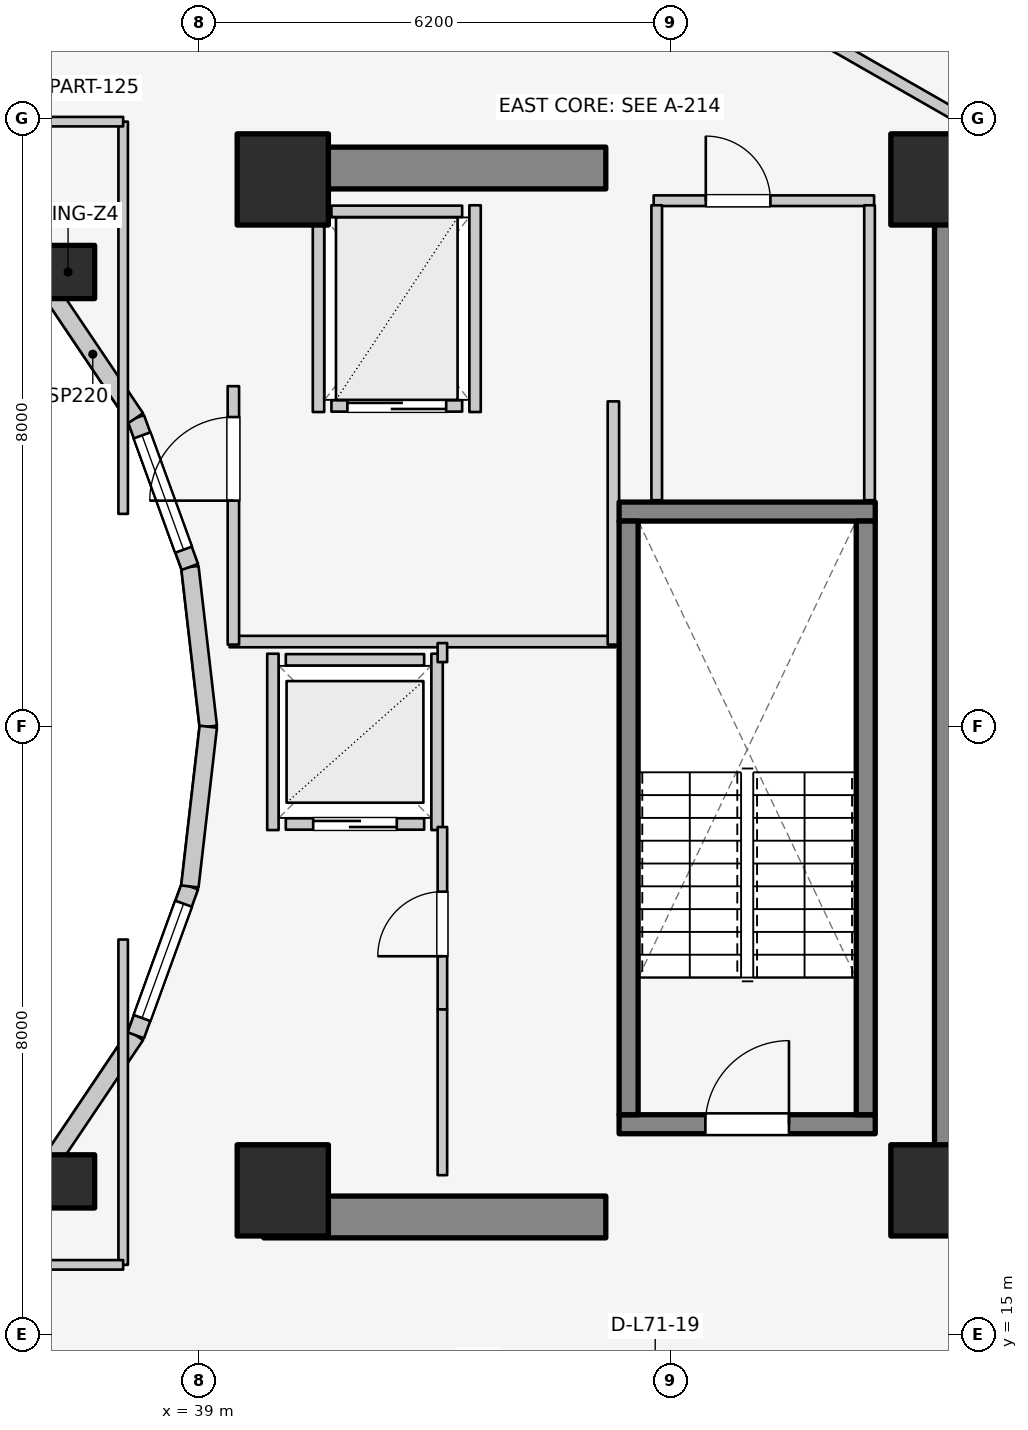
"""IFC4 building model, lengths in metres.
Left out: names, types, materials, properties, quantities, classifications, styles, units other than length and angle.
Written with IfcOpenShell. Run it as: python <this file> out.ifc"""

import sys

from ifc_helpers import new_model, si_unit, direction, frame, frame_2d, origin, origin_2d, place, context, subcontext, project, spatial, rectangle, extrude, element, fill, save


model = new_model("IFC4")
c1 = context("Model", 3, precision=1e-05, world=origin(), true_north=direction((0.0, 1.0)))
c2 = subcontext(c1, "Body", "Model", "MODEL_VIEW")
j1 = project(units=[si_unit("LENGTHUNIT", "METRE"), si_unit("PLANEANGLEUNIT", "RADIAN")], contexts=[c1])
p1 = place(None, origin())
s1 = spatial("IfcSite", under=j1, at=p1, CompositionType="ELEMENT")
p2 = place(p1, origin())
s2 = spatial("IfcBuilding", under=s1, at=p2, CompositionType="ELEMENT")
p3 = place(p2, frame((0.0, 0.0, 232.6)))
s3 = spatial("IfcBuildingStorey", under=s2, at=p3, CompositionType="ELEMENT", Elevation=232.6)
p4 = place(p3, frame((48.95, 17.05, 0.0), z_axis=(0.0, 0.0, 1.0), x_axis=(0.0, 1.0, 0.0)))
e1 = element("IfcWall", 1, at=p4, inside=s3, PredefinedType="SHEAR", context=c2, shape_type="SweptSolid", body=[
    extrude(rectangle(XDim=12.8, YDim=0.55, at=frame_2d((6.4, 0.0))), origin(), (0.0, 0.0, 1.0), 3.1),
])
for number, where, z_axis, x_axis in (
    (2, (39.85, 16.55, 0.0), (0.0, 0.0, 1.0), (1.0, 0.0, 0.0)),
    (3, (39.85, 30.35, 0.0), (0.0, 0.0, 1.0), (1.0, 0.0, 0.0)),
):
    element("IfcWall", number, at=place(p3, frame(where, z_axis=z_axis, x_axis=x_axis)), inside=s3, PredefinedType="SHEAR", context=c2, shape_type="SweptSolid", body=[
        extrude(rectangle(XDim=4.5, YDim=0.55, at=frame_2d((2.25, 0.0))), origin(), (0.0, 0.0, 1.0), 3.1),
    ])
p5 = place(p3, frame((44.525, 17.77, 0.0), z_axis=(0.0, 0.0, 1.0), x_axis=(1.0, 0.0, 0.0)))
e4 = element("IfcWall", 4, at=p5, inside=s3, PredefinedType="SOLIDWALL", context=c2, shape_type="SweptSolid", body=[
    extrude(rectangle(XDim=3.37, YDim=0.25, at=frame_2d((1.685, 0.0))), origin(), (0.0, 0.0, 1.0), 3.1),
])
p6 = place(p5, frame((1.135, 0.0, 0.0)))
e5 = element("IfcOpeningElement", 5, at=p6, cuts=e4, PredefinedType="OPENING", context=c2, shape_type="SweptSolid", body=[
    extrude(rectangle(XDim=1.1, YDim=2.1, at=frame_2d((0.55, 1.05))), frame((0.0, 0.135, 0.0), z_axis=(0.0, -1.0, 0.0), x_axis=(1.0, 0.0, 0.0)), (0.0, 0.0, 1.0), 0.27),
])
p7 = place(p3, frame((44.525, 25.83, 0.0), z_axis=(0.0, 0.0, 1.0), x_axis=(1.0, 0.0, 0.0)))
e6 = element("IfcWall", 6, at=p7, inside=s3, PredefinedType="SOLIDWALL", context=c2, shape_type="SweptSolid", body=[
    extrude(rectangle(XDim=3.37, YDim=0.25, at=frame_2d((1.685, 0.0))), origin(), (0.0, 0.0, 1.0), 3.1),
])
for number, where, z_axis, x_axis in (
    (7, (44.65, 17.895, 0.0), (0.0, 0.0, 1.0), (0.0, 1.0, 0.0)),
    (8, (47.77, 17.895, 0.0), (0.0, 0.0, 1.0), (0.0, 1.0, 0.0)),
):
    element("IfcWall", number, at=place(p3, frame(where, z_axis=z_axis, x_axis=x_axis)), inside=s3, PredefinedType="SOLIDWALL", context=c2, shape_type="SweptSolid", body=[
        extrude(rectangle(XDim=7.81, YDim=0.25, at=frame_2d((3.905, 0.0))), origin(), (0.0, 0.0, 1.0), 3.1),
    ])
for number, where, z_axis, x_axis in (
    (9, (40.1, 16.9, 0.0), (0.0, 0.0, 1.0), (1.0, 0.0, 0.0)),
    (10, (48.7, 16.9, 0.0), (0.0, 0.0, 1.0), (1.0, 0.0, 0.0)),
    (11, (48.7, 30.2, 0.0), (0.0, 0.0, 1.0), (1.0, 0.0, 0.0)),
    (12, (40.1, 30.2, 0.0), (0.0, 0.0, 1.0), (1.0, 0.0, 0.0)),
):
    element("IfcColumn", number, at=place(p3, frame(where, z_axis=z_axis, x_axis=x_axis)), inside=s3, PredefinedType="COLUMN", context=c2, shape_type="SweptSolid", body=[
        extrude(rectangle(XDim=1.2, YDim=1.2, at=origin_2d()), origin(), (0.0, 0.0, 1.0), 3.1),
    ])
for number, where, z_axis, x_axis in (
    (13, (37.275, 28.982, 0.0), (0.0, 0.0, 1.0), (1.0, 0.0, 0.0)),
    (14, (37.275, 17.018, 0.0), (0.0, 0.0, 1.0), (1.0, 0.0, 0.0)),
):
    element("IfcColumn", number, at=place(p3, frame(where, z_axis=z_axis, x_axis=x_axis)), inside=s3, PredefinedType="COLUMN", context=c2, shape_type="SweptSolid", body=[
        extrude(rectangle(XDim=0.7, YDim=0.7, at=origin_2d()), origin(), (0.0, 0.0, 1.0), 3.1),
    ])
p8 = place(p3, frame((39.12, 23.0, 0.0), z_axis=(0.0, 0.0, 1.0), x_axis=(-0.114711713601, 0.993398823617, 0.0)))
e15 = element("IfcWall", 15, at=p8, inside=s3, PredefinedType="STANDARD", context=c2, shape_type="SweptSolid", body=[
    extrude(rectangle(XDim=2.115, YDim=0.23, at=frame_2d((1.058, 0.0))), origin(), (0.0, 0.0, 1.0), 2.84),
])
p9 = place(p3, frame((38.877, 25.102, 0.0), z_axis=(0.0, 0.0, 1.0), x_axis=(-0.341423187295, 0.93990968033, 0.0)))
e16 = element("IfcWall", 16, at=p9, inside=s3, PredefinedType="STANDARD", context=c2, shape_type="SweptSolid", body=[
    extrude(rectangle(XDim=2.084, YDim=0.23, at=frame_2d((1.042, 0.0))), origin(), (0.0, 0.0, 1.0), 2.84),
])
p10 = place(p9, frame((0.242, 0.0, 0.85)))
e17 = element("IfcOpeningElement", 17, at=p10, cuts=e16, PredefinedType="OPENING", context=c2, shape_type="SweptSolid", body=[
    extrude(rectangle(XDim=1.6, YDim=1.65, at=frame_2d((0.8, 0.825))), frame((0.0, 0.125, 0.0), z_axis=(0.0, -1.0, 0.0), x_axis=(1.0, 0.0, 0.0)), (0.0, 0.0, 1.0), 0.25),
])
p11 = place(p3, frame((38.166, 27.06, 0.0), z_axis=(0.0, 0.0, 1.0), x_axis=(-0.558197800898, 0.829707909492, 0.0)))
e18 = element("IfcWall", 18, at=p11, inside=s3, PredefinedType="STANDARD", context=c2, shape_type="SweptSolid", body=[
    extrude(rectangle(XDim=2.027, YDim=0.23, at=frame_2d((1.013, 0.0))), origin(), (0.0, 0.0, 1.0), 2.16),
])
for number, where, z_axis, x_axis in (
    (19, (37.035, 28.742, 0.0), (0.0, 0.0, 1.0), (-0.753, 0.659, 0.0)),
    (20, (35.56, 15.968, 0.0), (0.0, 0.0, 1.0), (0.753, 0.659, 0.0)),
):
    element("IfcWall", number, at=place(p3, frame(where, z_axis=z_axis, x_axis=x_axis)), inside=s3, PredefinedType="STANDARD", context=c2, shape_type="SweptSolid", body=[
        extrude(rectangle(XDim=1.959, YDim=0.23, at=frame_2d((0.98, 0.0))), origin(), (0.0, 0.0, 1.0), 2.16),
    ])
p12 = place(p3, frame((37.035, 17.258, 0.0), z_axis=(0.0, 0.0, 1.0), x_axis=(0.558197800898, 0.829707909492, 0.0)))
e21 = element("IfcWall", 21, at=p12, inside=s3, PredefinedType="STANDARD", context=c2, shape_type="SweptSolid", body=[
    extrude(rectangle(XDim=2.027, YDim=0.23, at=frame_2d((1.013, 0.0))), origin(), (0.0, 0.0, 1.0), 2.16),
])
p13 = place(p3, frame((38.166, 18.94, 0.0), z_axis=(0.0, 0.0, 1.0), x_axis=(0.341423187295, 0.93990968033, 0.0)))
e22 = element("IfcWall", 22, at=p13, inside=s3, PredefinedType="STANDARD", context=c2, shape_type="SweptSolid", body=[
    extrude(rectangle(XDim=2.084, YDim=0.23, at=frame_2d((1.042, 0.0))), origin(), (0.0, 0.0, 1.0), 2.84),
])
p14 = place(p13, frame((0.242, 0.0, 0.85)))
e23 = element("IfcOpeningElement", 23, at=p14, cuts=e22, PredefinedType="OPENING", context=c2, shape_type="SweptSolid", body=[
    extrude(rectangle(XDim=1.6, YDim=1.65, at=frame_2d((0.8, 0.825))), frame((0.0, 0.125, 0.0), z_axis=(0.0, -1.0, 0.0), x_axis=(1.0, 0.0, 0.0)), (0.0, 0.0, 1.0), 0.25),
])
p15 = place(p3, frame((38.877, 20.898, 0.0), z_axis=(0.0, 0.0, 1.0), x_axis=(0.114711713601, 0.993398823617, 0.0)))
e24 = element("IfcWall", 24, at=p15, inside=s3, PredefinedType="STANDARD", context=c2, shape_type="SweptSolid", body=[
    extrude(rectangle(XDim=2.115, YDim=0.23, at=frame_2d((1.058, 0.0))), origin(), (0.0, 0.0, 1.0), 2.84),
])
p16 = place(p3, frame((50.761, 31.849, 0.0), z_axis=(0.0, 0.0, 1.0), x_axis=(-0.72731899451, 0.686299555752, 0.0)))
e25 = element("IfcWall", 25, at=p16, inside=s3, PredefinedType="STANDARD", context=c2, shape_type="SweptSolid", body=[
    extrude(rectangle(XDim=4.404, YDim=0.26, at=frame_2d((2.202, 0.0))), origin(), (0.0, 0.0, 1.0), 2.85),
])
p17 = place(p16, frame((1.452, 0.0, 0.75)))
e26 = element("IfcOpeningElement", 26, at=p17, cuts=e25, PredefinedType="OPENING", context=c2, shape_type="SweptSolid", body=[
    extrude(rectangle(XDim=1.5, YDim=1.6, at=frame_2d((0.75, 0.8))), frame((0.0, 0.14, 0.0), z_axis=(0.0, -1.0, 0.0), x_axis=(1.0, 0.0, 0.0)), (0.0, 0.0, 1.0), 0.28),
])
p18 = place(p3, frame((40.14, 21.72, 0.0), z_axis=(0.0, 0.0, 1.0), x_axis=(1.0, 0.0, 0.0)))
e27 = element("IfcWall", 27, at=p18, inside=s3, PredefinedType="SOLIDWALL", context=c2, shape_type="SweptSolid", body=[
    extrude(rectangle(XDim=1.82, YDim=0.15, at=frame_2d((0.91, 0.0))), origin(), (0.0, 0.0, 1.0), 2.12),
])
p19 = place(p18, frame((0.36, 0.0, 0.0)))
e28 = element("IfcOpeningElement", 28, at=p19, cuts=e27, PredefinedType="OPENING", context=c2, shape_type="SweptSolid", body=[
    extrude(rectangle(XDim=1.1, YDim=2.1, at=frame_2d((0.55, 1.05))), frame((0.0, 0.085, 0.0), z_axis=(0.0, -1.0, 0.0), x_axis=(1.0, 0.0, 0.0)), (0.0, 0.0, 1.0), 0.17),
])
p20 = place(p3, frame((40.14, 23.88, 0.0), z_axis=(0.0, 0.0, 1.0), x_axis=(1.0, 0.0, 0.0)))
e29 = element("IfcWall", 29, at=p20, inside=s3, PredefinedType="SOLIDWALL", context=c2, shape_type="SweptSolid", body=[
    extrude(rectangle(XDim=1.82, YDim=0.15, at=frame_2d((0.91, 0.0))), origin(), (0.0, 0.0, 1.0), 2.12),
])
p21 = place(p3, frame((39.97, 21.64, 0.0), z_axis=(0.0, 0.0, 1.0), x_axis=(0.0, 1.0, 0.0)))
e30 = element("IfcWall", 30, at=p21, inside=s3, PredefinedType="SOLIDWALL", context=c2, shape_type="SweptSolid", body=[
    extrude(rectangle(XDim=2.32, YDim=0.15, at=frame_2d((1.16, 0.0))), origin(), (0.0, 0.0, 1.0), 2.12),
])
p22 = place(p3, frame((42.13, 21.64, 0.0), z_axis=(0.0, 0.0, 1.0), x_axis=(0.0, 1.0, 0.0)))
e31 = element("IfcWall", 31, at=p22, inside=s3, PredefinedType="SOLIDWALL", context=c2, shape_type="SweptSolid", body=[
    extrude(rectangle(XDim=2.32, YDim=0.15, at=frame_2d((1.16, 0.0))), origin(), (0.0, 0.0, 1.0), 2.855),
])
p23 = place(p3, frame((40.74, 27.22, 0.0), z_axis=(0.0, 0.0, 1.0), x_axis=(1.0, 0.0, 0.0)))
e32 = element("IfcWall", 32, at=p23, inside=s3, PredefinedType="SOLIDWALL", context=c2, shape_type="SweptSolid", body=[
    extrude(rectangle(XDim=1.72, YDim=0.15, at=frame_2d((0.86, 0.0))), origin(), (0.0, 0.0, 1.0), 2.855),
])
p24 = place(p23, frame((0.21, 0.0, 0.0)))
e33 = element("IfcOpeningElement", 33, at=p24, cuts=e32, PredefinedType="OPENING", context=c2, shape_type="SweptSolid", body=[
    extrude(rectangle(XDim=1.3, YDim=2.1, at=frame_2d((0.65, 1.05))), frame((0.0, 0.085, 0.0), z_axis=(0.0, -1.0, 0.0), x_axis=(1.0, 0.0, 0.0)), (0.0, 0.0, 1.0), 0.17),
])
p25 = place(p3, frame((40.74, 29.78, 0.0), z_axis=(0.0, 0.0, 1.0), x_axis=(1.0, 0.0, 0.0)))
e34 = element("IfcWall", 34, at=p25, inside=s3, PredefinedType="SOLIDWALL", context=c2, shape_type="SweptSolid", body=[
    extrude(rectangle(XDim=1.72, YDim=0.15, at=frame_2d((0.86, 0.0))), origin(), (0.0, 0.0, 1.0), 2.855),
])
for number, where, z_axis, x_axis in (
    (35, (40.57, 27.14, 0.0), (0.0, 0.0, 1.0), (0.0, 1.0, 0.0)),
    (36, (42.63, 27.14, 0.0), (0.0, 0.0, 1.0), (0.0, 1.0, 0.0)),
):
    element("IfcWall", number, at=place(p3, frame(where, z_axis=z_axis, x_axis=x_axis)), inside=s3, PredefinedType="SOLIDWALL", context=c2, shape_type="SweptSolid", body=[
        extrude(rectangle(XDim=2.72, YDim=0.15, at=frame_2d((1.36, 0.0))), origin(), (0.0, 0.0, 1.0), 2.855),
    ])
p26 = place(p3, frame((39.4, 24.12, 0.0), z_axis=(0.0, 0.0, 1.0), x_axis=(1.0, 0.0, 0.0)))
e37 = element("IfcWall", 37, at=p26, inside=s3, PredefinedType="PARTITIONING", context=c2, shape_type="SweptSolid", body=[
    extrude(rectangle(XDim=5.08, YDim=0.15, at=frame_2d((2.54, 0.0))), origin(), (0.0, 0.0, 1.0), 2.12),
])
p27 = place(p3, frame((44.45, 24.08, 0.0), z_axis=(0.0, 0.0, 1.0), x_axis=(0.0, 1.0, 0.0)))
e38 = element("IfcWall", 38, at=p27, inside=s3, PredefinedType="PARTITIONING", context=c2, shape_type="SweptSolid", body=[
    extrude(rectangle(XDim=3.2, YDim=0.15, at=frame_2d((1.6, 0.0))), origin(), (0.0, 0.0, 1.0), 2.855),
])
p28 = place(p3, frame((39.45, 24.08, 0.0), z_axis=(0.0, 0.0, 1.0), x_axis=(0.0, 1.0, 0.0)))
e39 = element("IfcWall", 39, at=p28, inside=s3, PredefinedType="PARTITIONING", context=c2, shape_type="SweptSolid", body=[
    extrude(rectangle(XDim=3.4, YDim=0.15, at=frame_2d((1.7, 0.0))), origin(), (0.0, 0.0, 1.0), 2.855),
])
p29 = place(p28, frame((1.894, 0.0, 0.0)))
e40 = element("IfcOpeningElement", 40, at=p29, cuts=e39, PredefinedType="OPENING", context=c2, shape_type="SweptSolid", body=[
    extrude(rectangle(XDim=1.1, YDim=2.1, at=frame_2d((0.55, 1.05))), frame((0.0, 0.085, 0.0), z_axis=(0.0, -1.0, 0.0), x_axis=(1.0, 0.0, 0.0)), (0.0, 0.0, 1.0), 0.17),
])
p30 = place(p3, frame((42.2, 19.28, 0.0), z_axis=(0.0, 0.0, 1.0), x_axis=(0.0, 1.0, 0.0)))
e41 = element("IfcWall", 41, at=p30, inside=s3, PredefinedType="PARTITIONING", context=c2, shape_type="SweptSolid", body=[
    extrude(rectangle(XDim=2.4, YDim=0.125, at=frame_2d((1.2, 0.0))), origin(), (0.0, 0.0, 1.0), 2.855),
])
p31 = place(p30, frame((0.7, 0.0, 0.0)))
e42 = element("IfcOpeningElement", 42, at=p31, cuts=e41, PredefinedType="OPENING", context=c2, shape_type="SweptSolid", body=[
    extrude(rectangle(XDim=0.85, YDim=2.05, at=frame_2d((0.425, 1.025))), frame((0.0, 0.073, 0.0), z_axis=(0.0, -1.0, 0.0), x_axis=(1.0, 0.0, 0.0)), (0.0, 0.0, 1.0), 0.145),
])
p32 = place(p3, frame((42.2, 23.85, 0.0), z_axis=(0.0, 0.0, 1.0), x_axis=(0.0, 1.0, 0.0)))
e43 = element("IfcWall", 43, at=p32, inside=s3, PredefinedType="PARTITIONING", context=c2, shape_type="SweptSolid", body=[
    extrude(rectangle(XDim=0.25, YDim=0.125, at=frame_2d((0.125, 0.0))), origin(), (0.0, 0.0, 1.0), 2.855),
])
p33 = place(p3, frame((42.2, 17.1, 0.0), z_axis=(0.0, 0.0, 1.0), x_axis=(0.0, 1.0, 0.0)))
e44 = element("IfcWall", 44, at=p33, inside=s3, PredefinedType="PARTITIONING", context=c2, shape_type="SweptSolid", body=[
    extrude(rectangle(XDim=2.18, YDim=0.125, at=frame_2d((1.09, 0.0))), origin(), (0.0, 0.0, 1.0), 2.855),
])
p34 = place(p3, frame((44.98, 29.92, 0.0), z_axis=(0.0, 0.0, 1.0), x_axis=(1.0, 0.0, 0.0)))
e45 = element("IfcWall", 45, at=p34, inside=s3, PredefinedType="PLUMBINGWALL", context=c2, shape_type="SweptSolid", body=[
    extrude(rectangle(XDim=2.9, YDim=0.14, at=frame_2d((1.45, 0.0))), origin(), (0.0, 0.0, 1.0), 2.855),
])
p35 = place(p34, frame((0.686, 0.0, 0.0)))
e46 = element("IfcOpeningElement", 46, at=p35, cuts=e45, PredefinedType="OPENING", context=c2, shape_type="SweptSolid", body=[
    extrude(rectangle(XDim=0.85, YDim=2.05, at=frame_2d((0.425, 1.025))), frame((0.0, 0.08, 0.0), z_axis=(0.0, -1.0, 0.0), x_axis=(1.0, 0.0, 0.0)), (0.0, 0.0, 1.0), 0.16),
])
for number, where, z_axis, x_axis in (
    (47, (45.02, 25.98, 0.0), (0.0, 0.0, 1.0), (0.0, 1.0, 0.0)),
    (48, (47.82, 25.98, 0.0), (0.0, 0.0, 1.0), (0.0, 1.0, 0.0)),
):
    element("IfcWall", number, at=place(p3, frame(where, z_axis=z_axis, x_axis=x_axis)), inside=s3, PredefinedType="PLUMBINGWALL", context=c2, shape_type="SweptSolid", body=[
        extrude(rectangle(XDim=3.88, YDim=0.14, at=frame_2d((1.94, 0.0))), origin(), (0.0, 0.0, 1.0), 2.855),
    ])
p36 = place(p3, frame((35.55, 30.015, 0.0), z_axis=(0.0, 0.0, 1.0), x_axis=(0.522763432117, 0.852477796802, 0.0)))
e49 = element("IfcWall", 49, at=p36, inside=s3, PredefinedType="PARTITIONING", context=c2, shape_type="SweptSolid", body=[
    extrude(rectangle(XDim=3.269, YDim=0.125, at=frame_2d((1.635, 0.0))), origin(), (0.0, 0.0, 1.0), 2.376),
])
p37 = place(p3, frame((35.55, 15.985, 0.0), z_axis=(0.0, 0.0, 1.0), x_axis=(0.52592395012, -0.850531597702, 0.0)))
e50 = element("IfcWall", 50, at=p37, inside=s3, PredefinedType="PARTITIONING", context=c2, shape_type="SweptSolid", body=[
    extrude(rectangle(XDim=2.869, YDim=0.125, at=frame_2d((1.435, 0.0))), origin(), (0.0, 0.0, 1.0), 2.376),
])
p38 = place(p3, frame((38.0, 25.8, 0.0), z_axis=(0.0, 0.0, 1.0), x_axis=(0.0, 1.0, 0.0)))
e51 = element("IfcWall", 51, at=p38, inside=s3, PredefinedType="PARTITIONING", context=c2, shape_type="SweptSolid", body=[
    extrude(rectangle(XDim=5.16, YDim=0.125, at=frame_2d((2.58, 0.0))), origin(), (0.0, 0.0, 1.0), 2.232),
])
p39 = place(p3, frame((35.4, 30.96, 0.0), z_axis=(0.0, 0.0, 1.0), x_axis=(1.0, 0.0, 0.0)))
e52 = element("IfcWall", 52, at=p39, inside=s3, PredefinedType="PARTITIONING", context=c2, shape_type="SweptSolid", body=[
    extrude(rectangle(XDim=2.6, YDim=0.125, at=frame_2d((1.3, 0.0))), origin(), (0.0, 0.0, 1.0), 2.376),
])
p40 = place(p3, frame((38.0, 15.92, 0.0), z_axis=(0.0, 0.0, 1.0), x_axis=(0.0, 1.0, 0.0)))
e53 = element("IfcWall", 53, at=p40, inside=s3, PredefinedType="PARTITIONING", context=c2, shape_type="SweptSolid", body=[
    extrude(rectangle(XDim=4.28, YDim=0.125, at=frame_2d((2.14, 0.0))), origin(), (0.0, 0.0, 1.0), 2.232),
])
p41 = place(p3, frame((35.4, 15.92, 0.0), z_axis=(0.0, 0.0, 1.0), x_axis=(1.0, 0.0, 0.0)))
e54 = element("IfcWall", 54, at=p41, inside=s3, PredefinedType="PARTITIONING", context=c2, shape_type="SweptSolid", body=[
    extrude(rectangle(XDim=2.6, YDim=0.125, at=frame_2d((1.3, 0.0))), origin(), (0.0, 0.0, 1.0), 2.232),
])
p42 = place(p3, frame((46.757, 32.305, 0.0), z_axis=(0.0, 0.0, 1.0), x_axis=(0.867991349648, -0.496579315857, 0.0)))
e55 = element("IfcWall", 55, at=p42, inside=s3, PredefinedType="PARTITIONING", context=c2, shape_type="SweptSolid", body=[
    extrude(rectangle(XDim=2.567, YDim=0.15, at=frame_2d((1.283, 0.0))), origin(), (0.0, 0.0, 1.0), 2.22),
])
p43 = place(p10, origin())
e56 = element("IfcWindow", 56, at=p43, inside=s3, PartitioningType="SINGLE_PANEL", PredefinedType="WINDOW", context=c2, shape_type="SweptSolid", body=[
    extrude(rectangle(XDim=1.6, YDim=1.65, at=frame_2d((0.8, 0.825))), frame((0.0, 0.03, 0.0), z_axis=(0.0, -1.0, 0.0), x_axis=(1.0, 0.0, 0.0)), (0.0, 0.0, 1.0), 0.06),
])
fill(e17, e56)
p44 = place(p14, origin())
e57 = element("IfcWindow", 57, at=p44, inside=s3, PartitioningType="SINGLE_PANEL", PredefinedType="WINDOW", context=c2, shape_type="SweptSolid", body=[
    extrude(rectangle(XDim=1.6, YDim=1.65, at=frame_2d((0.8, 0.825))), frame((0.0, 0.03, 0.0), z_axis=(0.0, -1.0, 0.0), x_axis=(1.0, 0.0, 0.0)), (0.0, 0.0, 1.0), 0.06),
])
fill(e23, e57)
p45 = place(p6, origin())
e58 = element("IfcDoor", 58, at=p45, inside=s3, OperationType="SINGLE_SWING_RIGHT", PredefinedType="DOOR", context=c2, shape_type="SweptSolid", body=[
    extrude(rectangle(XDim=1.1, YDim=2.1, at=frame_2d((0.55, 1.05))), frame((0.0, 0.025, 0.0), z_axis=(0.0, -1.0, 0.0), x_axis=(1.0, 0.0, 0.0)), (0.0, 0.0, 1.0), 0.05),
])
fill(e5, e58)
p46 = place(p19, origin())
e59 = element("IfcDoor", 59, at=p46, inside=s3, OperationType="DOUBLE_DOOR_SLIDING", PredefinedType="DOOR", context=c2, shape_type="SweptSolid", body=[
    extrude(rectangle(XDim=1.1, YDim=2.1, at=frame_2d((0.55, 1.05))), frame((0.0, 0.025, 0.0), z_axis=(0.0, -1.0, 0.0), x_axis=(1.0, 0.0, 0.0)), (0.0, 0.0, 1.0), 0.05),
])
fill(e28, e59)
p47 = place(p24, origin())
e60 = element("IfcDoor", 60, at=p47, inside=s3, OperationType="DOUBLE_DOOR_SLIDING", PredefinedType="DOOR", context=c2, shape_type="SweptSolid", body=[
    extrude(rectangle(XDim=1.3, YDim=2.1, at=frame_2d((0.65, 1.05))), frame((0.0, 0.025, 0.0), z_axis=(0.0, -1.0, 0.0), x_axis=(1.0, 0.0, 0.0)), (0.0, 0.0, 1.0), 0.05),
])
fill(e33, e60)
p48 = place(p29, origin())
e61 = element("IfcDoor", 61, at=p48, inside=s3, OperationType="SINGLE_SWING_LEFT", PredefinedType="DOOR", context=c2, shape_type="SweptSolid", body=[
    extrude(rectangle(XDim=1.1, YDim=2.1, at=frame_2d((0.55, 1.05))), frame((0.0, 0.025, 0.0), z_axis=(0.0, -1.0, 0.0), x_axis=(1.0, 0.0, 0.0)), (0.0, 0.0, 1.0), 0.05),
])
fill(e40, e61)
p49 = place(p31, origin())
e62 = element("IfcDoor", 62, at=p49, inside=s3, OperationType="SINGLE_SWING_LEFT", PredefinedType="DOOR", context=c2, shape_type="SweptSolid", body=[
    extrude(rectangle(XDim=0.85, YDim=2.05, at=frame_2d((0.425, 1.025))), frame((0.0, 0.025, 0.0), z_axis=(0.0, -1.0, 0.0), x_axis=(1.0, 0.0, 0.0)), (0.0, 0.0, 1.0), 0.05),
])
fill(e42, e62)
p50 = place(p35, origin())
e63 = element("IfcDoor", 63, at=p50, inside=s3, OperationType="SINGLE_SWING_LEFT", PredefinedType="DOOR", context=c2, shape_type="SweptSolid", body=[
    extrude(rectangle(XDim=0.85, YDim=2.05, at=frame_2d((0.425, 1.025))), frame((0.0, 0.025, 0.0), z_axis=(0.0, -1.0, 0.0), x_axis=(1.0, 0.0, 0.0)), (0.0, 0.0, 1.0), 0.05),
])
fill(e46, e63)
save(model, sys.argv[1])
